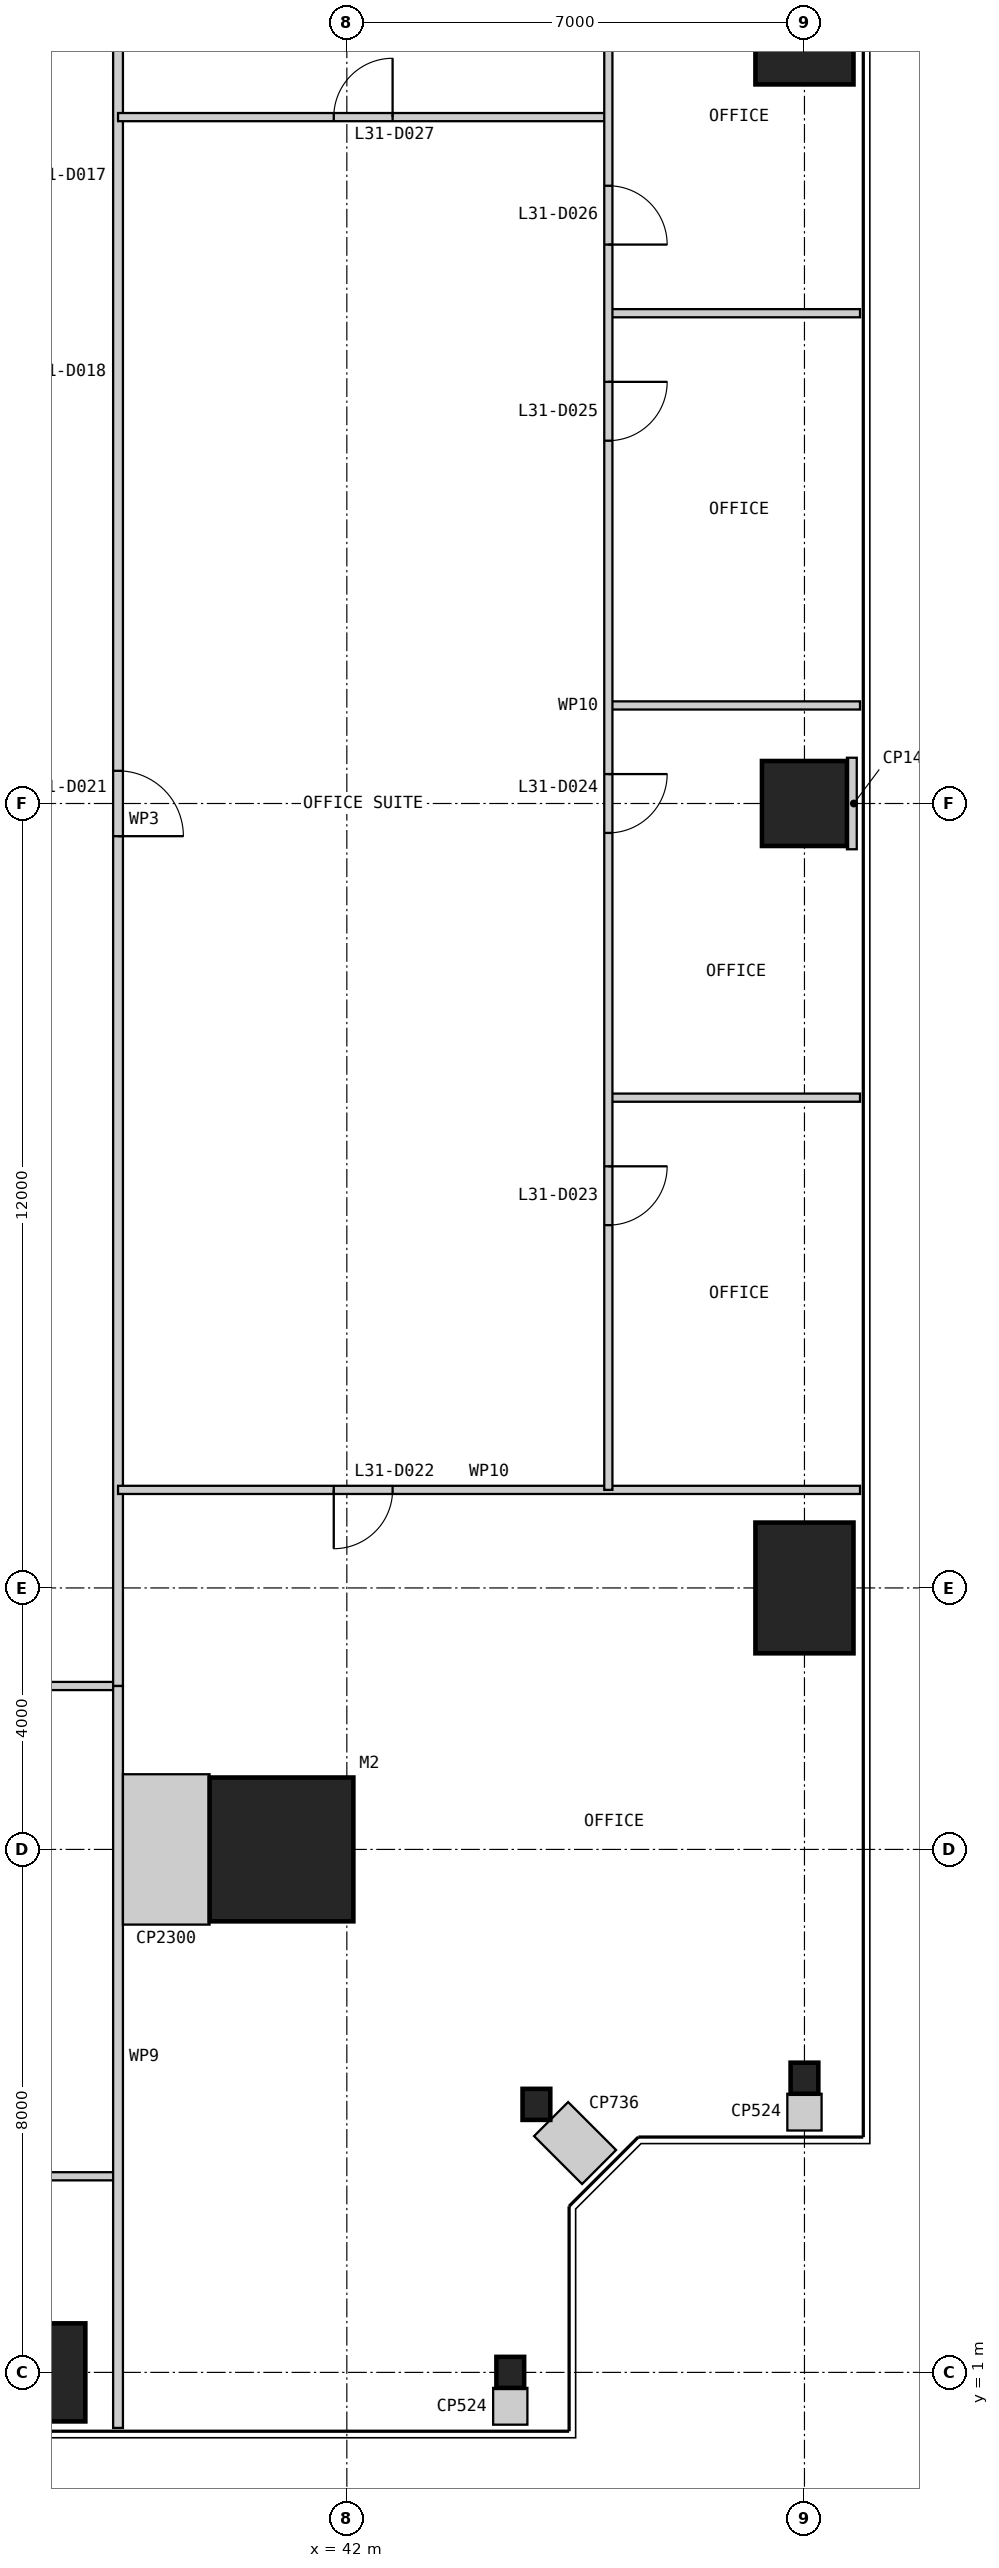
"""IFC4 building model, lengths in metres.
Left out: names, types, materials, properties, quantities, classifications, styles, units other than length and angle.
Written with IfcOpenShell. Run it as: python <this file> out.ifc"""

import sys

from ifc_helpers import new_model, si_unit, direction, frame, frame_2d, origin, origin_2d, place, context, subcontext, project, spatial, rectangle, i_section, extrude, element, fill, save


model = new_model("IFC4")
c1 = context("Model", 3, precision=1e-05, world=origin(), true_north=direction((0.0, 1.0)))
c2 = subcontext(c1, "Body", "Model", "MODEL_VIEW")
j1 = project(units=[si_unit("LENGTHUNIT", "METRE"), si_unit("PLANEANGLEUNIT", "RADIAN")], contexts=[c1])
p1 = place(None, origin())
s1 = spatial("IfcSite", under=j1, at=p1, CompositionType="ELEMENT")
p2 = place(p1, origin())
s2 = spatial("IfcBuilding", under=s1, at=p2, CompositionType="ELEMENT")
p3 = place(p2, frame((0.0, 0.0, 134.4)))
s3 = spatial("IfcBuildingStorey", under=s2, at=p3, CompositionType="ELEMENT", Elevation=134.4)
p4 = place(p3, frame((41.0, 9.0, 0.0), z_axis=(0.0, 0.0, 1.0), x_axis=(1.0, 0.0, 0.0)))
e1 = element("IfcColumn", 1, at=p4, inside=s3, PredefinedType="COLUMN", context=c2, shape_type="SweptSolid", body=[
    extrude(rectangle(XDim=2.2, YDim=2.2, at=origin_2d()), origin(), (0.0, 0.0, 1.0), 4.0),
])
p5 = place(p3, frame((37.0, 1.0, 0.0), z_axis=(0.0, 0.0, 1.0), x_axis=(1.0, 0.0, 0.0)))
e2 = element("IfcColumn", 2, at=p5, inside=s3, PredefinedType="COLUMN", context=c2, shape_type="SweptSolid", body=[
    extrude(rectangle(XDim=2.0, YDim=1.5, at=origin_2d()), origin(), (0.0, 0.0, 1.0), 4.0),
])
for number, where, z_axis, x_axis in (
    (3, (44.5, 1.0, 0.0), (0.0, 0.0, 1.0), (1.0, 0.0, 0.0)),
    (4, (44.9, 5.1, 0.0), (0.0, 0.0, 1.0), (1.0, 0.0, 0.0)),
    (5, (49.0, 5.5, 0.0), (0.0, 0.0, 1.0), (1.0, 0.0, 0.0)),
):
    element("IfcColumn", number, at=place(p3, frame(where, z_axis=z_axis, x_axis=x_axis)), inside=s3, PredefinedType="COLUMN", context=c2, shape_type="SweptSolid", body=[
        extrude(i_section(OverallWidth=0.424, OverallDepth=0.475, WebThickness=0.048, FlangeThickness=0.077, at=origin_2d()), origin(), (0.0, 0.0, 1.0), 4.0),
    ])
p6 = place(p3, frame((49.0, 13.0, 0.0), z_axis=(0.0, 0.0, 1.0), x_axis=(1.0, 0.0, 0.0)))
e6 = element("IfcColumn", 6, at=p6, inside=s3, PredefinedType="COLUMN", context=c2, shape_type="SweptSolid", body=[
    extrude(rectangle(XDim=1.5, YDim=2.0, at=origin_2d()), origin(), (0.0, 0.0, 1.0), 4.0),
])
p7 = place(p3, frame((49.0, 25.0, 0.0), z_axis=(0.0, 0.0, 1.0), x_axis=(1.0, 0.0, 0.0)))
e7 = element("IfcColumn", 7, at=p7, inside=s3, PredefinedType="COLUMN", context=c2, shape_type="SweptSolid", body=[
    extrude(rectangle(XDim=1.3, YDim=1.3, at=origin_2d()), origin(), (0.0, 0.0, 1.0), 4.0),
])
p8 = place(p3, frame((49.0, 37.0, 0.0), z_axis=(0.0, 0.0, 1.0), x_axis=(1.0, 0.0, 0.0)))
e8 = element("IfcColumn", 8, at=p8, inside=s3, PredefinedType="COLUMN", context=c2, shape_type="SweptSolid", body=[
    extrude(rectangle(XDim=1.5, YDim=2.0, at=origin_2d()), origin(), (0.0, 0.0, 1.0), 4.0),
])
p9 = place(p3, frame((32.5, 4.0, 0.0), z_axis=(0.0, 0.0, 1.0), x_axis=(1.0, 0.0, 0.0)))
e9 = element("IfcWall", 9, at=p9, inside=s3, PredefinedType="PARTITIONING", context=c2, shape_type="SweptSolid", body=[
    extrude(rectangle(XDim=6.0, YDim=0.125, at=frame_2d((3.0, 0.0))), origin(), (0.0, 0.0, 1.0), 3.85),
])
p10 = place(p3, frame((35.5, 11.5, 0.0), z_axis=(0.0, 0.0, 1.0), x_axis=(1.0, 0.0, 0.0)))
e10 = element("IfcWall", 10, at=p10, inside=s3, PredefinedType="PARTITIONING", context=c2, shape_type="SweptSolid", body=[
    extrude(rectangle(XDim=3.0, YDim=0.125, at=frame_2d((1.5, 0.0))), origin(), (0.0, 0.0, 1.0), 3.85),
])
p11 = place(p3, frame((38.5, 11.5, 0.0), z_axis=(0.0, 0.0, 1.0), x_axis=(0.0, 1.0, 0.0)))
e11 = element("IfcWall", 11, at=p11, inside=s3, PredefinedType="PARTITIONING", context=c2, shape_type="SweptSolid", body=[
    extrude(rectangle(XDim=27.0, YDim=0.15, at=frame_2d((13.5, 0.0))), origin(), (0.0, 0.0, 1.0), 3.85),
])
p12 = place(p11, frame((13.0, 0.0, 0.0)))
e12 = element("IfcOpeningElement", 12, at=p12, cuts=e11, PredefinedType="OPENING", context=c2, shape_type="SweptSolid", body=[
    extrude(rectangle(XDim=1.0, YDim=2.2, at=frame_2d((0.5, 1.1))), frame((0.0, 0.085, 0.0), z_axis=(0.0, -1.0, 0.0), x_axis=(1.0, 0.0, 0.0)), (0.0, 0.0, 1.0), 0.17),
])
p13 = place(p3, frame((38.5, 0.15, 0.0), z_axis=(0.0, 0.0, 1.0), x_axis=(0.0, 1.0, 0.0)))
e13 = element("IfcWall", 13, at=p13, inside=s3, PredefinedType="PARTITIONING", context=c2, shape_type="SweptSolid", body=[
    extrude(rectangle(XDim=11.35, YDim=0.15, at=frame_2d((5.675, 0.0))), origin(), (0.0, 0.0, 1.0), 3.85),
])
p14 = place(p3, frame((49.85, 14.5, 0.0), z_axis=(0.0, 0.0, 1.0), x_axis=(-1.0, 0.0, 0.0)))
e14 = element("IfcWall", 14, at=p14, inside=s3, PredefinedType="PARTITIONING", context=c2, shape_type="SweptSolid", body=[
    extrude(rectangle(XDim=11.35, YDim=0.125, at=frame_2d((5.675, 0.0))), origin(), (0.0, 0.0, 1.0), 3.85),
])
p15 = place(p14, frame((7.15, 0.0, 0.0)))
e15 = element("IfcOpeningElement", 15, at=p15, cuts=e14, PredefinedType="OPENING", context=c2, shape_type="SweptSolid", body=[
    extrude(rectangle(XDim=0.9, YDim=2.2, at=frame_2d((0.45, 1.1))), frame((0.0, 0.073, 0.0), z_axis=(0.0, -1.0, 0.0), x_axis=(1.0, 0.0, 0.0)), (0.0, 0.0, 1.0), 0.145),
])
for number, where, z_axis, x_axis in (
    (16, (49.85, 20.5, 0.0), (0.0, 0.0, 1.0), (-1.0, 0.0, 0.0)),
    (17, (49.85, 26.5, 0.0), (0.0, 0.0, 1.0), (-1.0, 0.0, 0.0)),
    (18, (49.85, 32.5, 0.0), (0.0, 0.0, 1.0), (-1.0, 0.0, 0.0)),
):
    element("IfcWall", number, at=place(p3, frame(where, z_axis=z_axis, x_axis=x_axis)), inside=s3, PredefinedType="PARTITIONING", context=c2, shape_type="SweptSolid", body=[
        extrude(rectangle(XDim=3.85, YDim=0.125, at=frame_2d((1.925, 0.0))), origin(), (0.0, 0.0, 1.0), 3.85),
    ])
p16 = place(p3, frame((46.0, 35.5, 0.0), z_axis=(0.0, 0.0, 1.0), x_axis=(-1.0, 0.0, 0.0)))
e19 = element("IfcWall", 19, at=p16, inside=s3, PredefinedType="PARTITIONING", context=c2, shape_type="SweptSolid", body=[
    extrude(rectangle(XDim=7.5, YDim=0.125, at=frame_2d((3.75, 0.0))), origin(), (0.0, 0.0, 1.0), 3.85),
])
p17 = place(p16, frame((3.3, 0.0, 0.0)))
e20 = element("IfcOpeningElement", 20, at=p17, cuts=e19, PredefinedType="OPENING", context=c2, shape_type="SweptSolid", body=[
    extrude(rectangle(XDim=0.9, YDim=2.2, at=frame_2d((0.45, 1.1))), frame((0.0, 0.073, 0.0), z_axis=(0.0, -1.0, 0.0), x_axis=(1.0, 0.0, 0.0)), (0.0, 0.0, 1.0), 0.145),
])
p18 = place(p3, frame((46.0, 14.5, 0.0), z_axis=(0.0, 0.0, 1.0), x_axis=(0.0, 1.0, 0.0)))
e21 = element("IfcWall", 21, at=p18, inside=s3, PredefinedType="PARTITIONING", context=c2, shape_type="SweptSolid", body=[
    extrude(rectangle(XDim=24.0, YDim=0.125, at=frame_2d((12.0, 0.0))), origin(), (0.0, 0.0, 1.0), 3.238),
])
p19 = place(p18, frame((4.05, 0.0, 0.0)))
e22 = element("IfcOpeningElement", 22, at=p19, cuts=e21, PredefinedType="OPENING", context=c2, shape_type="SweptSolid", body=[
    extrude(rectangle(XDim=0.9, YDim=2.2, at=frame_2d((0.45, 1.1))), frame((0.0, 0.073, 0.0), z_axis=(0.0, -1.0, 0.0), x_axis=(1.0, 0.0, 0.0)), (0.0, 0.0, 1.0), 0.145),
])
p20 = place(p18, frame((10.05, 0.0, 0.0)))
e23 = element("IfcOpeningElement", 23, at=p20, cuts=e21, PredefinedType="OPENING", context=c2, shape_type="SweptSolid", body=[
    extrude(rectangle(XDim=0.9, YDim=2.2, at=frame_2d((0.45, 1.1))), frame((0.0, 0.073, 0.0), z_axis=(0.0, -1.0, 0.0), x_axis=(1.0, 0.0, 0.0)), (0.0, 0.0, 1.0), 0.145),
])
p21 = place(p18, frame((16.05, 0.0, 0.0)))
e24 = element("IfcOpeningElement", 24, at=p21, cuts=e21, PredefinedType="OPENING", context=c2, shape_type="SweptSolid", body=[
    extrude(rectangle(XDim=0.9, YDim=2.2, at=frame_2d((0.45, 1.1))), frame((0.0, 0.073, 0.0), z_axis=(0.0, -1.0, 0.0), x_axis=(1.0, 0.0, 0.0)), (0.0, 0.0, 1.0), 0.145),
])
p22 = place(p18, frame((19.05, 0.0, 0.0)))
e25 = element("IfcOpeningElement", 25, at=p22, cuts=e21, PredefinedType="OPENING", context=c2, shape_type="SweptSolid", body=[
    extrude(rectangle(XDim=0.9, YDim=2.2, at=frame_2d((0.45, 1.1))), frame((0.0, 0.073, 0.0), z_axis=(0.0, -1.0, 0.0), x_axis=(1.0, 0.0, 0.0)), (0.0, 0.0, 1.0), 0.145),
])
p23 = place(p3, frame((38.575, 9.0, 0.0), z_axis=(0.0, 0.0, 1.0), x_axis=(1.0, 0.0, 0.0)))
e26 = element("IfcWall", 26, at=p23, inside=s3, PredefinedType="PARTITIONING", context=c2, shape_type="SweptSolid", body=[
    extrude(rectangle(XDim=1.325, YDim=2.3, at=frame_2d((0.663, 0.0))), origin(), (0.0, 0.0, 1.0), 3.85),
])
p24 = place(p3, frame((44.5, 0.2, 0.0), z_axis=(0.0, 0.0, 1.0), x_axis=(0.0, 1.0, 0.0)))
e27 = element("IfcWall", 27, at=p24, inside=s3, PredefinedType="PARTITIONING", context=c2, shape_type="SweptSolid", body=[
    extrude(rectangle(XDim=0.562, YDim=0.524, at=frame_2d((0.281, 0.0))), origin(), (0.0, 0.0, 1.0), 3.85),
])
p25 = place(p3, frame((45.859, 4.141, 0.0), z_axis=(0.0, 0.0, 1.0), x_axis=(-0.707106781187, 0.707106781187, 0.0)))
e28 = element("IfcWall", 28, at=p25, inside=s3, PredefinedType="PARTITIONING", context=c2, shape_type="SweptSolid", body=[
    extrude(rectangle(XDim=1.038, YDim=0.736, at=frame_2d((0.519, 0.0))), origin(), (0.0, 0.0, 1.0), 3.85),
])
p26 = place(p3, frame((49.0, 4.7, 0.0), z_axis=(0.0, 0.0, 1.0), x_axis=(0.0, 1.0, 0.0)))
e29 = element("IfcWall", 29, at=p26, inside=s3, PredefinedType="PARTITIONING", context=c2, shape_type="SweptSolid", body=[
    extrude(rectangle(XDim=0.562, YDim=0.524, at=frame_2d((0.281, 0.0))), origin(), (0.0, 0.0, 1.0), 3.85),
])
p27 = place(p3, frame((49.8, 25.0, 0.0), z_axis=(0.0, 0.0, 1.0), x_axis=(-1.0, 0.0, 0.0)))
e30 = element("IfcWall", 30, at=p27, inside=s3, PredefinedType="PARTITIONING", context=c2, shape_type="SweptSolid", body=[
    extrude(rectangle(XDim=0.15, YDim=1.4, at=frame_2d((0.075, 0.0))), origin(), (0.0, 0.0, 1.0), 3.85),
])
p28 = place(p12, frame((1.0, 0.0, 0.0), z_axis=(0.0, 0.0, 1.0), x_axis=(-1.0, 0.0, 0.0)))
e31 = element("IfcDoor", 31, at=p28, inside=s3, OperationType="SINGLE_SWING_RIGHT", PredefinedType="DOOR", context=c2, shape_type="SweptSolid", body=[
    extrude(rectangle(XDim=1.0, YDim=2.2, at=frame_2d((0.5, 1.1))), frame((0.0, 0.025, 0.0), z_axis=(0.0, -1.0, 0.0), x_axis=(1.0, 0.0, 0.0)), (0.0, 0.0, 1.0), 0.05),
])
fill(e12, e31)
p29 = place(p15, origin())
e32 = element("IfcDoor", 32, at=p29, inside=s3, OperationType="SINGLE_SWING_RIGHT", PredefinedType="DOOR", context=c2, shape_type="SweptSolid", body=[
    extrude(rectangle(XDim=0.9, YDim=2.2, at=frame_2d((0.45, 1.1))), frame((0.0, 0.025, 0.0), z_axis=(0.0, -1.0, 0.0), x_axis=(1.0, 0.0, 0.0)), (0.0, 0.0, 1.0), 0.05),
])
fill(e15, e32)
p30 = place(p19, frame((0.9, 0.0, 0.0), z_axis=(0.0, 0.0, 1.0), x_axis=(-1.0, 0.0, 0.0)))
e33 = element("IfcDoor", 33, at=p30, inside=s3, OperationType="SINGLE_SWING_LEFT", PredefinedType="DOOR", context=c2, shape_type="SweptSolid", body=[
    extrude(rectangle(XDim=0.9, YDim=2.2, at=frame_2d((0.45, 1.1))), frame((0.0, 0.025, 0.0), z_axis=(0.0, -1.0, 0.0), x_axis=(1.0, 0.0, 0.0)), (0.0, 0.0, 1.0), 0.05),
])
fill(e22, e33)
p31 = place(p20, frame((0.9, 0.0, 0.0), z_axis=(0.0, 0.0, 1.0), x_axis=(-1.0, 0.0, 0.0)))
e34 = element("IfcDoor", 34, at=p31, inside=s3, OperationType="SINGLE_SWING_LEFT", PredefinedType="DOOR", context=c2, shape_type="SweptSolid", body=[
    extrude(rectangle(XDim=0.9, YDim=2.2, at=frame_2d((0.45, 1.1))), frame((0.0, 0.025, 0.0), z_axis=(0.0, -1.0, 0.0), x_axis=(1.0, 0.0, 0.0)), (0.0, 0.0, 1.0), 0.05),
])
fill(e23, e34)
p32 = place(p21, frame((0.9, 0.0, 0.0), z_axis=(0.0, 0.0, 1.0), x_axis=(-1.0, 0.0, 0.0)))
e35 = element("IfcDoor", 35, at=p32, inside=s3, OperationType="SINGLE_SWING_LEFT", PredefinedType="DOOR", context=c2, shape_type="SweptSolid", body=[
    extrude(rectangle(XDim=0.9, YDim=2.2, at=frame_2d((0.45, 1.1))), frame((0.0, 0.025, 0.0), z_axis=(0.0, -1.0, 0.0), x_axis=(1.0, 0.0, 0.0)), (0.0, 0.0, 1.0), 0.05),
])
fill(e24, e35)
p33 = place(p22, frame((0.9, 0.0, 0.0), z_axis=(0.0, 0.0, 1.0), x_axis=(-1.0, 0.0, 0.0)))
e36 = element("IfcDoor", 36, at=p33, inside=s3, OperationType="SINGLE_SWING_RIGHT", PredefinedType="DOOR", context=c2, shape_type="SweptSolid", body=[
    extrude(rectangle(XDim=0.9, YDim=2.2, at=frame_2d((0.45, 1.1))), frame((0.0, 0.025, 0.0), z_axis=(0.0, -1.0, 0.0), x_axis=(1.0, 0.0, 0.0)), (0.0, 0.0, 1.0), 0.05),
])
fill(e25, e36)
p34 = place(p17, frame((0.9, 0.0, 0.0), z_axis=(0.0, 0.0, 1.0), x_axis=(-1.0, 0.0, 0.0)))
e37 = element("IfcDoor", 37, at=p34, inside=s3, OperationType="SINGLE_SWING_RIGHT", PredefinedType="DOOR", context=c2, shape_type="SweptSolid", body=[
    extrude(rectangle(XDim=0.9, YDim=2.2, at=frame_2d((0.45, 1.1))), frame((0.0, 0.025, 0.0), z_axis=(0.0, -1.0, 0.0), x_axis=(1.0, 0.0, 0.0)), (0.0, 0.0, 1.0), 0.05),
])
fill(e20, e37)
save(model, sys.argv[1])
